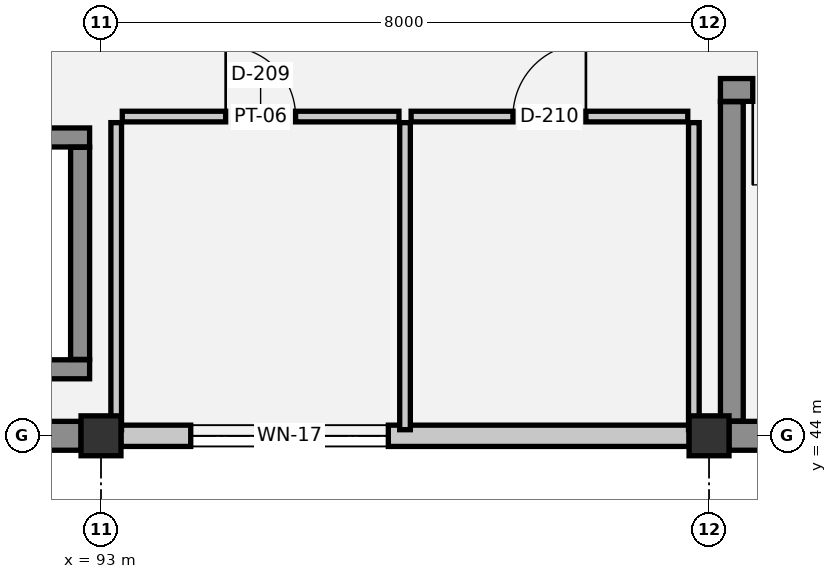
"""IFC4 building model, lengths in metres.
Left out: names, types, materials, properties, quantities, classifications, styles, units other than length and angle.
Written with IfcOpenShell. Run it as: python <this file> out.ifc"""

import sys

from ifc_helpers import new_model, si_unit, direction, frame, frame_2d, origin, origin_2d, place, context, subcontext, project, spatial, rectangle, extrude, element, fill, save


model = new_model("IFC4")
c1 = context("Model", 3, precision=1e-05, world=origin(), true_north=direction((0.0, 1.0)))
c2 = subcontext(c1, "Body", "Model", "MODEL_VIEW")
j1 = project(units=[si_unit("LENGTHUNIT", "METRE"), si_unit("PLANEANGLEUNIT", "RADIAN")], contexts=[c1])
p1 = place(None, origin())
s1 = spatial("IfcSite", under=j1, at=p1, CompositionType="ELEMENT")
p2 = place(p1, origin())
s2 = spatial("IfcBuilding", under=s1, at=p2, CompositionType="ELEMENT")
p3 = place(p2, frame((0.0, 0.0, 37.05)))
s3 = spatial("IfcBuildingStorey", under=s2, at=p3, CompositionType="ELEMENT", Elevation=37.05)
for number, where, z_axis, x_axis in (
    (1, (93.0, 44.0, 0.0), (0.0, 0.0, 1.0), (1.0, 0.0, 0.0)),
    (2, (101.0, 44.0, 0.0), (0.0, 0.0, 1.0), (1.0, 0.0, 0.0)),
):
    element("IfcColumn", number, at=place(p3, frame(where, z_axis=z_axis, x_axis=x_axis)), inside=s3, PredefinedType="COLUMN", context=c2, shape_type="SweptSolid", body=[
        extrude(rectangle(XDim=0.525, YDim=0.525, at=origin_2d()), origin(), (0.0, 0.0, 1.0), 3.75),
    ])
p4 = place(p3, frame((108.738, 44.0, 0.0), z_axis=(0.0, 0.0, 1.0), x_axis=(-1.0, 0.0, 0.0)))
e3 = element("IfcWall", 3, at=p4, inside=s3, PredefinedType="STANDARD", context=c2, shape_type="SweptSolid", body=[
    extrude(rectangle(XDim=7.475, YDim=0.38, at=frame_2d((3.738, 0.0))), origin(), (0.0, 0.0, 1.0), 2.6),
])
p5 = place(p3, frame((100.738, 44.0, 0.0), z_axis=(0.0, 0.0, 1.0), x_axis=(-1.0, 0.0, 0.0)))
e4 = element("IfcWall", 4, at=p5, inside=s3, PredefinedType="SOLIDWALL", context=c2, shape_type="SweptSolid", body=[
    extrude(rectangle(XDim=7.475, YDim=0.28, at=frame_2d((3.738, 0.0))), origin(), (0.0, 0.0, 1.0), 2.6),
])
p6 = place(p5, frame((3.957, 0.0, 1.0)))
e5 = element("IfcOpeningElement", 5, at=p6, cuts=e4, PredefinedType="OPENING", context=c2, shape_type="SweptSolid", body=[
    extrude(rectangle(XDim=2.6, YDim=1.1, at=frame_2d((1.3, 0.55))), frame((0.0, 0.15, 0.0), z_axis=(0.0, -1.0, 0.0), x_axis=(1.0, 0.0, 0.0)), (0.0, 0.0, 1.0), 0.3),
])
p7 = place(p3, frame((92.738, 44.0, 0.0), z_axis=(0.0, 0.0, 1.0), x_axis=(-1.0, 0.0, 0.0)))
e6 = element("IfcWall", 6, at=p7, inside=s3, PredefinedType="STANDARD", context=c2, shape_type="SweptSolid", body=[
    extrude(rectangle(XDim=7.475, YDim=0.38, at=frame_2d((3.738, 0.0))), origin(), (0.0, 0.0, 1.0), 2.6),
])
for number, where, z_axis, x_axis in (
    (7, (89.95, 44.875, 0.0), (0.0, 0.0, 1.0), (1.0, 0.0, 0.0)),
    (8, (92.85, 47.925, 0.0), (0.0, 0.0, 1.0), (-1.0, 0.0, 0.0)),
):
    element("IfcWall", number, at=place(p3, frame(where, z_axis=z_axis, x_axis=x_axis)), inside=s3, PredefinedType="SHEAR", context=c2, shape_type="SweptSolid", body=[
        extrude(rectangle(XDim=2.9, YDim=0.25, at=frame_2d((1.45, 0.0))), origin(), (0.0, 0.0, 1.0), 3.47),
    ])
p8 = place(p3, frame((92.725, 45.005, 0.0), z_axis=(0.0, 0.0, 1.0), x_axis=(0.0, 1.0, 0.0)))
e9 = element("IfcWall", 9, at=p8, inside=s3, PredefinedType="SHEAR", context=c2, shape_type="SweptSolid", body=[
    extrude(rectangle(XDim=2.79, YDim=0.25, at=frame_2d((1.395, 0.0))), origin(), (0.0, 0.0, 1.0), 3.47),
])
p9 = place(p3, frame((108.805, 48.55, 0.0), z_axis=(0.0, 0.0, 1.0), x_axis=(-1.0, 0.0, 0.0)))
e10 = element("IfcWall", 10, at=p9, inside=s3, PredefinedType="SHEAR", context=c2, shape_type="SweptSolid", body=[
    extrude(rectangle(XDim=7.655, YDim=0.3, at=frame_2d((3.828, 0.0))), origin(), (0.0, 0.0, 1.0), 3.47),
])
p10 = place(p9, frame((5.98, 0.0, 0.0)))
e11 = element("IfcOpeningElement", 11, at=p10, cuts=e10, PredefinedType="OPENING", context=c2, shape_type="SweptSolid", body=[
    extrude(rectangle(XDim=1.25, YDim=2.15, at=frame_2d((0.625, 1.075))), frame((0.0, 0.16, 0.0), z_axis=(0.0, -1.0, 0.0), x_axis=(1.0, 0.0, 0.0)), (0.0, 0.0, 1.0), 0.32),
])
p11 = place(p3, frame((101.3, 48.395, 0.0), z_axis=(0.0, 0.0, 1.0), x_axis=(0.0, -1.0, 0.0)))
e12 = element("IfcWall", 12, at=p11, inside=s3, PredefinedType="SHEAR", context=c2, shape_type="SweptSolid", body=[
    extrude(rectangle(XDim=4.2, YDim=0.3, at=frame_2d((2.1, 0.0))), origin(), (0.0, 0.0, 1.0), 3.47),
])
p12 = place(p3, frame((93.28, 48.2, 0.0), z_axis=(0.0, 0.0, 1.0), x_axis=(1.0, 0.0, 0.0)))
e13 = element("IfcWall", 13, at=p12, inside=s3, PredefinedType="PLUMBINGWALL", context=c2, shape_type="SweptSolid", body=[
    extrude(rectangle(XDim=3.64, YDim=0.14, at=frame_2d((1.82, 0.0))), origin(), (0.0, 0.0, 1.0), 3.39),
])
p13 = place(p12, frame((1.36, 0.0, 0.0)))
e14 = element("IfcOpeningElement", 14, at=p13, cuts=e13, PredefinedType="OPENING", context=c2, shape_type="SweptSolid", body=[
    extrude(rectangle(XDim=0.92, YDim=2.1, at=frame_2d((0.46, 1.05))), frame((0.0, 0.08, 0.0), z_axis=(0.0, -1.0, 0.0), x_axis=(1.0, 0.0, 0.0)), (0.0, 0.0, 1.0), 0.16),
])
p14 = place(p3, frame((97.08, 48.2, 0.0), z_axis=(0.0, 0.0, 1.0), x_axis=(1.0, 0.0, 0.0)))
e15 = element("IfcWall", 15, at=p14, inside=s3, PredefinedType="PLUMBINGWALL", context=c2, shape_type="SweptSolid", body=[
    extrude(rectangle(XDim=3.64, YDim=0.14, at=frame_2d((1.82, 0.0))), origin(), (0.0, 0.0, 1.0), 3.39),
])
p15 = place(p14, frame((1.34, 0.0, 0.0)))
e16 = element("IfcOpeningElement", 16, at=p15, cuts=e15, PredefinedType="OPENING", context=c2, shape_type="SweptSolid", body=[
    extrude(rectangle(XDim=0.96, YDim=2.1, at=frame_2d((0.48, 1.05))), frame((0.0, 0.08, 0.0), z_axis=(0.0, -1.0, 0.0), x_axis=(1.0, 0.0, 0.0)), (0.0, 0.0, 1.0), 0.16),
])
for number, where, z_axis, x_axis in (
    (17, (93.2, 44.08, 0.0), (0.0, 0.0, 1.0), (0.0, 1.0, 0.0)),
    (18, (97.0, 44.08, 0.0), (0.0, 0.0, 1.0), (0.0, 1.0, 0.0)),
    (19, (100.8, 44.08, 0.0), (0.0, 0.0, 1.0), (0.0, 1.0, 0.0)),
):
    element("IfcWall", number, at=place(p3, frame(where, z_axis=z_axis, x_axis=x_axis)), inside=s3, PredefinedType="PLUMBINGWALL", context=c2, shape_type="SweptSolid", body=[
        extrude(rectangle(XDim=4.04, YDim=0.14, at=frame_2d((2.02, 0.0))), origin(), (0.0, 0.0, 1.0), 3.39),
    ])
p16 = place(p6, origin())
e20 = element("IfcWindow", 20, at=p16, inside=s3, PartitioningType="SINGLE_PANEL", PredefinedType="WINDOW", context=c2, shape_type="SweptSolid", body=[
    extrude(rectangle(XDim=2.6, YDim=1.1, at=frame_2d((1.3, 0.55))), frame((0.0, 0.03, 0.0), z_axis=(0.0, -1.0, 0.0), x_axis=(1.0, 0.0, 0.0)), (0.0, 0.0, 1.0), 0.06),
])
fill(e5, e20)
p17 = place(p10, origin())
e21 = element("IfcDoor", 21, at=p17, inside=s3, OperationType="SINGLE_SWING_RIGHT", PredefinedType="DOOR", context=c2, shape_type="SweptSolid", body=[
    extrude(rectangle(XDim=1.25, YDim=2.15, at=frame_2d((0.625, 1.075))), frame((0.0, 0.025, 0.0), z_axis=(0.0, -1.0, 0.0), x_axis=(1.0, 0.0, 0.0)), (0.0, 0.0, 1.0), 0.05),
])
fill(e11, e21)
p18 = place(p13, origin())
e22 = element("IfcDoor", 22, at=p18, inside=s3, OperationType="SINGLE_SWING_LEFT", PredefinedType="DOOR", context=c2, shape_type="SweptSolid", body=[
    extrude(rectangle(XDim=0.92, YDim=2.1, at=frame_2d((0.46, 1.05))), frame((0.0, 0.025, 0.0), z_axis=(0.0, -1.0, 0.0), x_axis=(1.0, 0.0, 0.0)), (0.0, 0.0, 1.0), 0.05),
])
fill(e14, e22)
p19 = place(p15, origin())
e23 = element("IfcDoor", 23, at=p19, inside=s3, OperationType="SINGLE_SWING_RIGHT", PredefinedType="DOOR", context=c2, shape_type="SweptSolid", body=[
    extrude(rectangle(XDim=0.96, YDim=2.1, at=frame_2d((0.48, 1.05))), frame((0.0, 0.025, 0.0), z_axis=(0.0, -1.0, 0.0), x_axis=(1.0, 0.0, 0.0)), (0.0, 0.0, 1.0), 0.05),
])
fill(e16, e23)
save(model, sys.argv[1])
